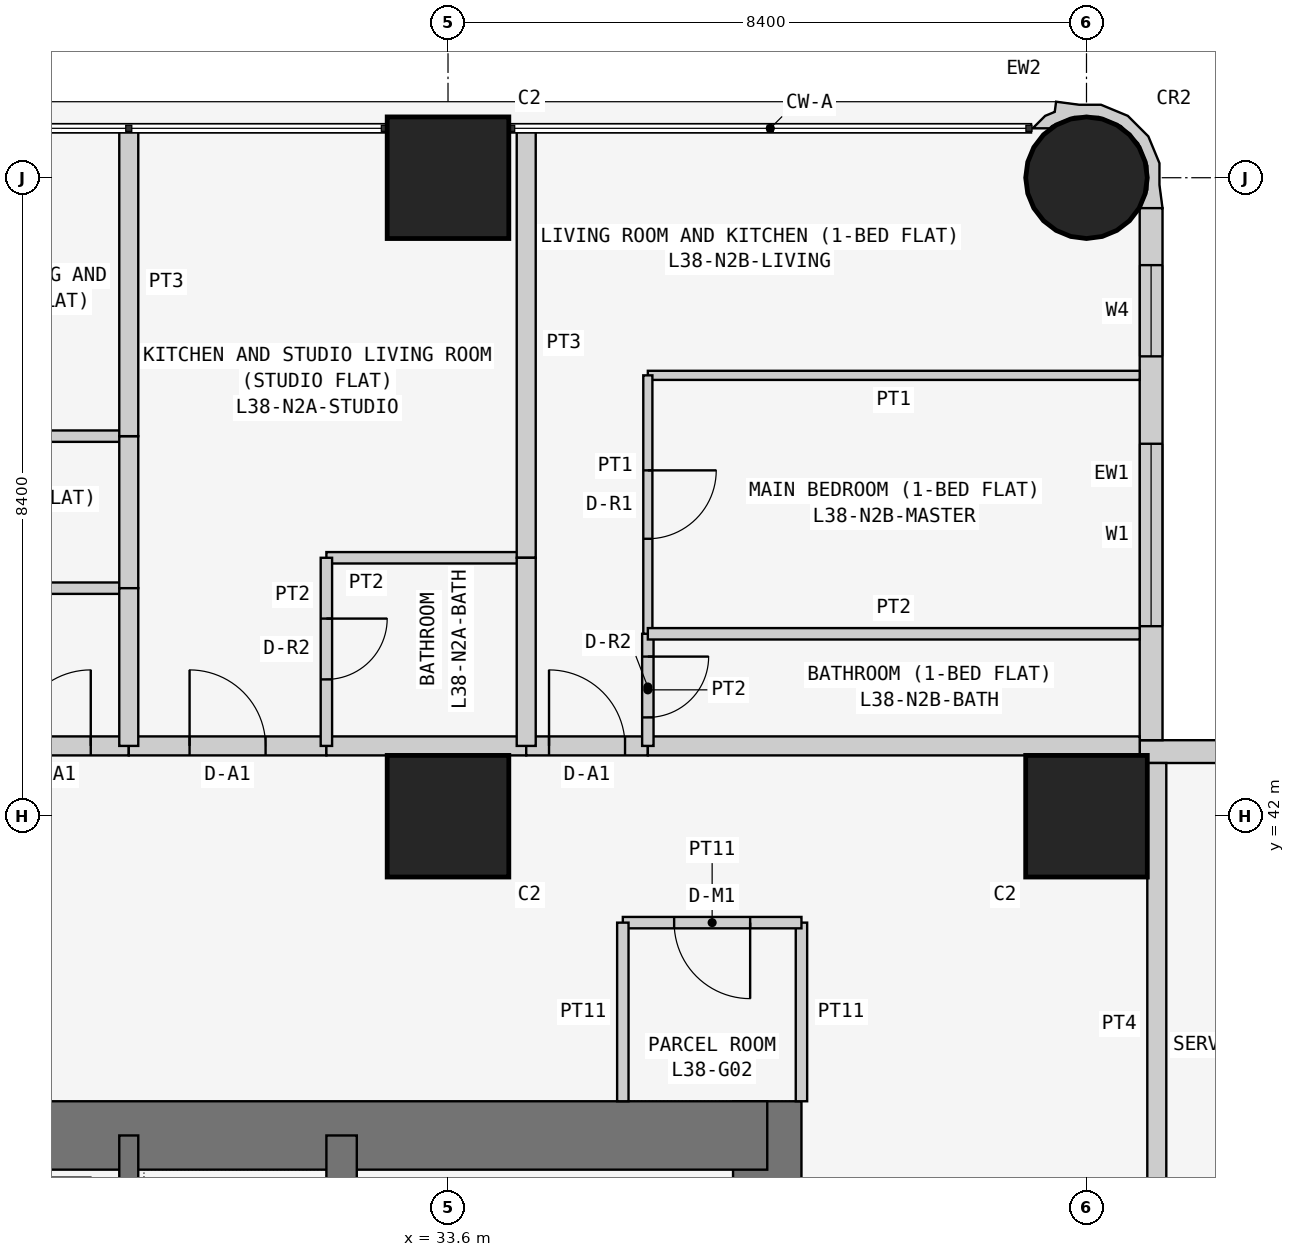
"""IFC4 building model, lengths in metres.
Left out: names, types, materials, properties, quantities, classifications, styles, units other than length and angle.
Written with IfcOpenShell. Run it as: python <this file> out.ifc"""

import sys

from ifc_helpers import new_model, si_unit, direction, frame, frame_2d, origin, origin_2d, place, context, subcontext, project, spatial, polyline, rectangle, circle, outline, extrude, element, fill, save


model = new_model("IFC4")
c1 = context("Model", 3, precision=1e-05, world=origin(), true_north=direction((0.0, 1.0)))
c2 = subcontext(c1, "Body", "Model", "MODEL_VIEW")
j1 = project(units=[si_unit("LENGTHUNIT", "METRE"), si_unit("PLANEANGLEUNIT", "RADIAN")], contexts=[c1])
p1 = place(None, origin())
s1 = spatial("IfcSite", under=j1, at=p1, CompositionType="ELEMENT")
p2 = place(p1, origin())
s2 = spatial("IfcBuilding", under=s1, at=p2, CompositionType="ELEMENT")
p3 = place(p2, frame((0.0, 0.0, 148.5)))
s3 = spatial("IfcBuildingStorey", under=s2, at=p3, CompositionType="ELEMENT", Elevation=148.5)
for number, where, z_axis, x_axis in (
    (1, (33.6, 42.0, 0.0), (0.0, 0.0, 1.0), (1.0, 0.0, 0.0)),
    (2, (33.6, 50.4, 0.0), (0.0, 0.0, 1.0), (1.0, 0.0, 0.0)),
    (3, (42.0, 42.0, 0.0), (0.0, 0.0, 1.0), (1.0, 0.0, 0.0)),
):
    element("IfcColumn", number, at=place(p3, frame(where, z_axis=z_axis, x_axis=x_axis)), inside=s3, PredefinedType="COLUMN", context=c2, shape_type="SweptSolid", body=[
        extrude(rectangle(XDim=1.6, YDim=1.6, at=origin_2d()), origin(), (0.0, 0.0, 1.0), 3.6),
    ])
p4 = place(p3, frame((42.0, 50.4, 0.0), z_axis=(0.0, 0.0, 1.0), x_axis=(1.0, 0.0, 0.0)))
e4 = element("IfcColumn", 4, at=p4, inside=s3, PredefinedType="COLUMN", context=c2, shape_type="SweptSolid", body=[
    extrude(circle(Radius=0.8, at=origin_2d()), origin(), (0.0, 0.0, 1.0), 3.6),
])
p5 = place(p3, frame((37.8, 21.0, 0.0), z_axis=(0.0, 0.0, 1.0), x_axis=(0.0, 1.0, 0.0)))
e5 = element("IfcWall", 5, at=p5, inside=s3, PredefinedType="SHEAR", context=c2, shape_type="SweptSolid", body=[
    extrude(rectangle(XDim=17.25, YDim=0.9, at=frame_2d((8.625, 0.0))), origin(), (0.0, 0.0, 1.0), 3.6),
])
p6 = place(p5, frame((5.2, 0.0, 0.0)))
e6 = element("IfcOpeningElement", 6, at=p6, cuts=e5, PredefinedType="OPENING", context=c2, shape_type="SweptSolid", body=[
    extrude(rectangle(XDim=1.2, YDim=2.1, at=frame_2d((0.6, 1.05))), frame((0.0, 0.46, 0.0), z_axis=(0.0, -1.0, 0.0), x_axis=(1.0, 0.0, 0.0)), (0.0, 0.0, 1.0), 0.92),
])
p7 = place(p3, frame((37.8, 37.8, 0.0), z_axis=(0.0, 0.0, 1.0), x_axis=(-1.0, 0.0, 0.0)))
e7 = element("IfcWall", 7, at=p7, inside=s3, PredefinedType="SHEAR", context=c2, shape_type="SweptSolid", body=[
    extrude(rectangle(XDim=17.25, YDim=0.9, at=frame_2d((8.625, 0.0))), origin(), (0.0, 0.0, 1.0), 3.6),
])
p8 = place(p3, frame((32.2, 29.2, 0.0), z_axis=(0.0, 0.0, 1.0), x_axis=(0.0, 1.0, 0.0)))
e8 = element("IfcWall", 8, at=p8, inside=s3, PredefinedType="SHEAR", context=c2, shape_type="SweptSolid", body=[
    extrude(rectangle(XDim=8.6, YDim=0.4, at=frame_2d((4.3, 0.0))), origin(), (0.0, 0.0, 1.0), 3.6),
])
p9 = place(p3, frame((29.4, 34.6, 0.0), z_axis=(0.0, 0.0, 1.0), x_axis=(0.0, 1.0, 0.0)))
e9 = element("IfcWall", 9, at=p9, inside=s3, PredefinedType="SHEAR", context=c2, shape_type="SweptSolid", body=[
    extrude(rectangle(XDim=3.2, YDim=0.25, at=frame_2d((1.6, 0.0))), origin(), (0.0, 0.0, 1.0), 3.6),
])
p10 = place(p3, frame((58.4, 42.85, 0.0), z_axis=(0.0, 0.0, 1.0), x_axis=(-1.0, 0.0, 0.0)))
e10 = element("IfcWall", 10, at=p10, inside=s3, PredefinedType="SOLIDWALL", context=c2, shape_type="SweptSolid", body=[
    extrude(rectangle(XDim=15.7, YDim=0.3, at=frame_2d((7.85, 0.0))), origin(), (0.0, 0.0, 1.0), 3.45),
])
p11 = place(p10, frame((12.4, 0.0, 0.9)))
e11 = element("IfcOpeningElement", 11, at=p11, cuts=e10, PredefinedType="OPENING", context=c2, shape_type="SweptSolid", body=[
    extrude(rectangle(XDim=1.8, YDim=1.5, at=frame_2d((0.9, 0.75))), frame((0.0, 0.16, 0.0), z_axis=(0.0, -1.0, 0.0), x_axis=(1.0, 0.0, 0.0)), (0.0, 0.0, 1.0), 0.32),
])
p12 = place(p10, frame((9.55, 0.0, 1.5)))
e12 = element("IfcOpeningElement", 12, at=p12, cuts=e10, PredefinedType="OPENING", context=c2, shape_type="SweptSolid", body=[
    extrude(rectangle(XDim=0.9, YDim=0.7, at=frame_2d((0.45, 0.35))), frame((0.0, 0.16, 0.0), z_axis=(0.0, -1.0, 0.0), x_axis=(1.0, 0.0, 0.0)), (0.0, 0.0, 1.0), 0.32),
])
p13 = place(p10, frame((5.1, 0.0, 0.9)))
e13 = element("IfcOpeningElement", 13, at=p13, cuts=e10, PredefinedType="OPENING", context=c2, shape_type="SweptSolid", body=[
    extrude(rectangle(XDim=1.8, YDim=1.5, at=frame_2d((0.9, 0.75))), frame((0.0, 0.16, 0.0), z_axis=(0.0, -1.0, 0.0), x_axis=(1.0, 0.0, 0.0)), (0.0, 0.0, 1.0), 0.32),
])
p14 = place(p10, frame((2.0, 0.0, 0.0)))
e14 = element("IfcOpeningElement", 14, at=p14, cuts=e10, PredefinedType="OPENING", context=c2, shape_type="SweptSolid", body=[
    extrude(rectangle(XDim=0.9, YDim=2.4, at=frame_2d((0.45, 1.2))), frame((0.0, 0.16, 0.0), z_axis=(0.0, -1.0, 0.0), x_axis=(1.0, 0.0, 0.0)), (0.0, 0.0, 1.0), 0.32),
])
p15 = place(p10, frame((0.7, 0.0, 0.9)))
e15 = element("IfcOpeningElement", 15, at=p15, cuts=e10, PredefinedType="OPENING", context=c2, shape_type="SweptSolid", body=[
    extrude(rectangle(XDim=1.2, YDim=1.5, at=frame_2d((0.6, 0.75))), frame((0.0, 0.16, 0.0), z_axis=(0.0, -1.0, 0.0), x_axis=(1.0, 0.0, 0.0)), (0.0, 0.0, 1.0), 0.32),
])
p16 = place(p3, frame((42.85, 43.0, 0.0), z_axis=(0.0, 0.0, 1.0), x_axis=(0.0, 1.0, 0.0)))
e16 = element("IfcWall", 16, at=p16, inside=s3, PredefinedType="SOLIDWALL", context=c2, shape_type="SweptSolid", body=[
    extrude(rectangle(XDim=7.0, YDim=0.3, at=frame_2d((3.5, 0.0))), origin(), (0.0, 0.0, 1.0), 3.45),
])
p17 = place(p16, frame((1.5, 0.0, 0.9)))
e17 = element("IfcOpeningElement", 17, at=p17, cuts=e16, PredefinedType="OPENING", context=c2, shape_type="SweptSolid", body=[
    extrude(rectangle(XDim=2.4, YDim=1.5, at=frame_2d((1.2, 0.75))), frame((0.0, 0.16, 0.0), z_axis=(0.0, -1.0, 0.0), x_axis=(1.0, 0.0, 0.0)), (0.0, 0.0, 1.0), 0.32),
])
p18 = place(p16, frame((5.05, 0.0, 0.9)))
e18 = element("IfcOpeningElement", 18, at=p18, cuts=e16, PredefinedType="OPENING", context=c2, shape_type="SweptSolid", body=[
    extrude(rectangle(XDim=1.2, YDim=1.5, at=frame_2d((0.6, 0.75))), frame((0.0, 0.16, 0.0), z_axis=(0.0, -1.0, 0.0), x_axis=(1.0, 0.0, 0.0)), (0.0, 0.0, 1.0), 0.32),
])
p19 = place(p3, frame((42.817, 50.073, 0.0), z_axis=(0.0, 0.0, 1.0), x_axis=(0.343276641956, 0.93923434088, 0.0)))
e19 = element("IfcWall", 19, at=p19, inside=s3, PredefinedType="SOLIDWALL", context=c2, shape_type="SweptSolid", body=[
    extrude(outline(polyline([(0.266, -0.055), (0.535, 0.044), (0.817, 0.302), (0.978, 0.648), (0.994, 1.03), (0.895, 1.3), (0.828, 1.598), (0.697, 1.569), (0.604, 1.67), (0.394, 1.767), (0.471, 1.556), (0.509, 1.539), (0.724, 1.304), (0.833, 1.005), (0.82, 0.687), (0.686, 0.397), (0.451, 0.182), (0.152, 0.073), (-0.116, 0.084), (-0.128, 0.078), (-0.146, 0.071), (-0.006, -0.197), (0.266, -0.055)])), origin(), (0.0, 0.0, 1.0), 3.45),
])
p20 = place(p3, frame((38.25, 38.25, 0.0), z_axis=(0.0, 0.0, 1.0), x_axis=(0.0, 1.0, 0.0)))
e20 = element("IfcWall", 20, at=p20, inside=s3, PredefinedType="PARTITIONING", context=c2, shape_type="SweptSolid", body=[
    extrude(rectangle(XDim=2.35, YDim=0.15, at=frame_2d((1.175, 0.0))), origin(), (0.0, 0.0, 1.0), 3.45),
])
p21 = place(p3, frame((38.25, 40.6, 0.0), z_axis=(0.0, 0.0, 1.0), x_axis=(-1.0, 0.0, 0.0)))
e21 = element("IfcWall", 21, at=p21, inside=s3, PredefinedType="PARTITIONING", context=c2, shape_type="SweptSolid", body=[
    extrude(rectangle(XDim=2.35, YDim=0.15, at=frame_2d((1.175, 0.0))), origin(), (0.0, 0.0, 1.0), 3.45),
])
p22 = place(p21, frame((0.675, 0.0, 0.0)))
e22 = element("IfcOpeningElement", 22, at=p22, cuts=e21, PredefinedType="OPENING", context=c2, shape_type="SweptSolid", body=[
    extrude(rectangle(XDim=1.0, YDim=2.1, at=frame_2d((0.5, 1.05))), frame((0.0, 0.085, 0.0), z_axis=(0.0, -1.0, 0.0), x_axis=(1.0, 0.0, 0.0)), (0.0, 0.0, 1.0), 0.17),
])
p23 = place(p3, frame((35.9, 40.6, 0.0), z_axis=(0.0, 0.0, 1.0), x_axis=(0.0, -1.0, 0.0)))
e23 = element("IfcWall", 23, at=p23, inside=s3, PredefinedType="PARTITIONING", context=c2, shape_type="SweptSolid", body=[
    extrude(rectangle(XDim=2.35, YDim=0.15, at=frame_2d((1.175, 0.0))), origin(), (0.0, 0.0, 1.0), 3.45),
])
p24 = place(p3, frame((22.971, 42.925, 0.0), z_axis=(0.0, 0.0, 1.0), x_axis=(1.0, 0.0, 0.0)))
e24 = element("IfcWall", 24, at=p24, inside=s3, PredefinedType="PARTITIONING", context=c2, shape_type="SweptSolid", body=[
    extrude(rectangle(XDim=6.429, YDim=0.25, at=frame_2d((3.214, 0.0))), origin(), (0.0, 0.0, 1.0), 3.45),
])
p25 = place(p24, frame((4.929, 0.0, 0.0)))
e25 = element("IfcOpeningElement", 25, at=p25, cuts=e24, PredefinedType="OPENING", context=c2, shape_type="SweptSolid", body=[
    extrude(rectangle(XDim=1.0, YDim=2.1, at=frame_2d((0.5, 1.05))), frame((0.0, 0.135, 0.0), z_axis=(0.0, -1.0, 0.0), x_axis=(1.0, 0.0, 0.0)), (0.0, 0.0, 1.0), 0.27),
])
p26 = place(p3, frame((29.4, 42.925, 0.0), z_axis=(0.0, 0.0, 1.0), x_axis=(1.0, 0.0, 0.0)))
e26 = element("IfcWall", 26, at=p26, inside=s3, PredefinedType="PARTITIONING", context=c2, shape_type="SweptSolid", body=[
    extrude(rectangle(XDim=2.6, YDim=0.25, at=frame_2d((1.3, 0.0))), origin(), (0.0, 0.0, 1.0), 3.45),
])
p27 = place(p26, frame((0.8, 0.0, 0.0)))
e27 = element("IfcOpeningElement", 27, at=p27, cuts=e26, PredefinedType="OPENING", context=c2, shape_type="SweptSolid", body=[
    extrude(rectangle(XDim=1.0, YDim=2.1, at=frame_2d((0.5, 1.05))), frame((0.0, 0.135, 0.0), z_axis=(0.0, -1.0, 0.0), x_axis=(1.0, 0.0, 0.0)), (0.0, 0.0, 1.0), 0.27),
])
p28 = place(p3, frame((32.0, 42.925, 0.0), z_axis=(0.0, 0.0, 1.0), x_axis=(1.0, 0.0, 0.0)))
e28 = element("IfcWall", 28, at=p28, inside=s3, PredefinedType="PARTITIONING", context=c2, shape_type="SweptSolid", body=[
    extrude(rectangle(XDim=2.629, YDim=0.25, at=frame_2d((1.314, 0.0))), origin(), (0.0, 0.0, 1.0), 3.45),
])
p29 = place(p3, frame((34.629, 42.925, 0.0), z_axis=(0.0, 0.0, 1.0), x_axis=(1.0, 0.0, 0.0)))
e29 = element("IfcWall", 29, at=p29, inside=s3, PredefinedType="PARTITIONING", context=c2, shape_type="SweptSolid", body=[
    extrude(rectangle(XDim=1.6, YDim=0.25, at=frame_2d((0.8, 0.0))), origin(), (0.0, 0.0, 1.0), 3.45),
])
p30 = place(p29, frame((0.3, 0.0, 0.0)))
e30 = element("IfcOpeningElement", 30, at=p30, cuts=e29, PredefinedType="OPENING", context=c2, shape_type="SweptSolid", body=[
    extrude(rectangle(XDim=1.0, YDim=2.1, at=frame_2d((0.5, 1.05))), frame((0.0, 0.135, 0.0), z_axis=(0.0, -1.0, 0.0), x_axis=(1.0, 0.0, 0.0)), (0.0, 0.0, 1.0), 0.27),
])
p31 = place(p3, frame((36.229, 42.925, 0.0), z_axis=(0.0, 0.0, 1.0), x_axis=(1.0, 0.0, 0.0)))
e31 = element("IfcWall", 31, at=p31, inside=s3, PredefinedType="PARTITIONING", context=c2, shape_type="SweptSolid", body=[
    extrude(rectangle(XDim=6.471, YDim=0.25, at=frame_2d((3.235, 0.0))), origin(), (0.0, 0.0, 1.0), 3.45),
])
p32 = place(p3, frame((42.925, 42.7, 0.0), z_axis=(0.0, 0.0, 1.0), x_axis=(0.0, -1.0, 0.0)))
e32 = element("IfcWall", 32, at=p32, inside=s3, PredefinedType="PARTITIONING", context=c2, shape_type="SweptSolid", body=[
    extrude(rectangle(XDim=6.871, YDim=0.25, at=frame_2d((3.436, 0.0))), origin(), (0.0, 0.0, 1.0), 3.45),
])
for number, where, z_axis, x_axis in (
    (33, (29.4, 47.0, 0.0), (0.0, 0.0, 1.0), (-1.0, 0.0, 0.0)),
    (34, (24.171, 45.0, 0.0), (0.0, 0.0, 1.0), (1.0, 0.0, 0.0)),
):
    element("IfcWall", number, at=place(p3, frame(where, z_axis=z_axis, x_axis=x_axis)), inside=s3, PredefinedType="PARTITIONING", context=c2, shape_type="SweptSolid", body=[
        extrude(rectangle(XDim=5.229, YDim=0.15, at=frame_2d((2.615, 0.0))), origin(), (0.0, 0.0, 1.0), 3.45),
    ])
p33 = place(p3, frame((29.4, 45.0, 0.0), z_axis=(0.0, 0.0, 1.0), x_axis=(0.0, 1.0, 0.0)))
e35 = element("IfcWall", 35, at=p33, inside=s3, PredefinedType="PARTITIONING", context=c2, shape_type="SweptSolid", body=[
    extrude(rectangle(XDim=2.0, YDim=0.25, at=frame_2d((1.0, 0.0))), origin(), (0.0, 0.0, 1.0), 2.848),
])
p34 = place(p3, frame((29.4, 45.0, 0.0), z_axis=(0.0, 0.0, 1.0), x_axis=(0.0, -1.0, 0.0)))
e36 = element("IfcWall", 36, at=p34, inside=s3, PredefinedType="PARTITIONING", context=c2, shape_type="SweptSolid", body=[
    extrude(rectangle(XDim=2.075, YDim=0.25, at=frame_2d((1.038, 0.0))), origin(), (0.0, 0.0, 1.0), 2.848),
])
p35 = place(p3, frame((29.4, 51.05, 0.0), z_axis=(0.0, 0.0, 1.0), x_axis=(0.0, -1.0, 0.0)))
e37 = element("IfcWall", 37, at=p35, inside=s3, PredefinedType="PARTITIONING", context=c2, shape_type="SweptSolid", body=[
    extrude(rectangle(XDim=4.05, YDim=0.25, at=frame_2d((2.025, 0.0))), origin(), (0.0, 0.0, 1.0), 2.848),
])
p36 = place(p3, frame((34.629, 45.4, 0.0), z_axis=(0.0, 0.0, 1.0), x_axis=(-1.0, 0.0, 0.0)))
e38 = element("IfcWall", 38, at=p36, inside=s3, PredefinedType="PARTITIONING", context=c2, shape_type="SweptSolid", body=[
    extrude(rectangle(XDim=2.629, YDim=0.15, at=frame_2d((1.314, 0.0))), origin(), (0.0, 0.0, 1.0), 3.45),
])
p37 = place(p3, frame((32.0, 45.4, 0.0), z_axis=(0.0, 0.0, 1.0), x_axis=(0.0, -1.0, 0.0)))
e39 = element("IfcWall", 39, at=p37, inside=s3, PredefinedType="PARTITIONING", context=c2, shape_type="SweptSolid", body=[
    extrude(rectangle(XDim=2.475, YDim=0.15, at=frame_2d((1.237, 0.0))), origin(), (0.0, 0.0, 1.0), 3.45),
])
p38 = place(p37, frame((0.8, 0.0, 0.0)))
e40 = element("IfcOpeningElement", 40, at=p38, cuts=e39, PredefinedType="OPENING", context=c2, shape_type="SweptSolid", body=[
    extrude(rectangle(XDim=0.8, YDim=2.1, at=frame_2d((0.4, 1.05))), frame((0.0, 0.085, 0.0), z_axis=(0.0, -1.0, 0.0), x_axis=(1.0, 0.0, 0.0)), (0.0, 0.0, 1.0), 0.17),
])
p39 = place(p3, frame((34.629, 51.05, 0.0), z_axis=(0.0, 0.0, 1.0), x_axis=(0.0, -1.0, 0.0)))
e41 = element("IfcWall", 41, at=p39, inside=s3, PredefinedType="PARTITIONING", context=c2, shape_type="SweptSolid", body=[
    extrude(rectangle(XDim=5.65, YDim=0.25, at=frame_2d((2.825, 0.0))), origin(), (0.0, 0.0, 1.0), 3.45),
])
p40 = place(p3, frame((34.629, 45.4, 0.0), z_axis=(0.0, 0.0, 1.0), x_axis=(0.0, -1.0, 0.0)))
e42 = element("IfcWall", 42, at=p40, inside=s3, PredefinedType="PARTITIONING", context=c2, shape_type="SweptSolid", body=[
    extrude(rectangle(XDim=2.475, YDim=0.25, at=frame_2d((1.237, 0.0))), origin(), (0.0, 0.0, 1.0), 3.45),
])
p41 = place(p3, frame((36.229, 44.4, 0.0), z_axis=(0.0, 0.0, 1.0), x_axis=(0.0, -1.0, 0.0)))
e43 = element("IfcWall", 43, at=p41, inside=s3, PredefinedType="PARTITIONING", context=c2, shape_type="SweptSolid", body=[
    extrude(rectangle(XDim=1.475, YDim=0.15, at=frame_2d((0.737, 0.0))), origin(), (0.0, 0.0, 1.0), 3.45),
])
p42 = place(p41, frame((0.3, 0.0, 0.0)))
e44 = element("IfcOpeningElement", 44, at=p42, cuts=e43, PredefinedType="OPENING", context=c2, shape_type="SweptSolid", body=[
    extrude(rectangle(XDim=0.8, YDim=2.1, at=frame_2d((0.4, 1.05))), frame((0.0, 0.085, 0.0), z_axis=(0.0, -1.0, 0.0), x_axis=(1.0, 0.0, 0.0)), (0.0, 0.0, 1.0), 0.17),
])
p43 = place(p3, frame((42.7, 47.8, 0.0), z_axis=(0.0, 0.0, 1.0), x_axis=(-1.0, 0.0, 0.0)))
e45 = element("IfcWall", 45, at=p43, inside=s3, PredefinedType="PARTITIONING", context=c2, shape_type="SweptSolid", body=[
    extrude(rectangle(XDim=6.471, YDim=0.12, at=frame_2d((3.235, 0.0))), origin(), (0.0, 0.0, 1.0), 3.45),
])
p44 = place(p3, frame((36.229, 47.8, 0.0), z_axis=(0.0, 0.0, 1.0), x_axis=(0.0, -1.0, 0.0)))
e46 = element("IfcWall", 46, at=p44, inside=s3, PredefinedType="PARTITIONING", context=c2, shape_type="SweptSolid", body=[
    extrude(rectangle(XDim=3.4, YDim=0.12, at=frame_2d((1.7, 0.0))), origin(), (0.0, 0.0, 1.0), 3.45),
])
p45 = place(p44, frame((1.25, 0.0, 0.0)))
e47 = element("IfcOpeningElement", 47, at=p45, cuts=e46, PredefinedType="OPENING", context=c2, shape_type="SweptSolid", body=[
    extrude(rectangle(XDim=0.9, YDim=2.1, at=frame_2d((0.45, 1.05))), frame((0.0, 0.07, 0.0), z_axis=(0.0, -1.0, 0.0), x_axis=(1.0, 0.0, 0.0)), (0.0, 0.0, 1.0), 0.14),
])
p46 = place(p3, frame((36.229, 44.4, 0.0), z_axis=(0.0, 0.0, 1.0), x_axis=(1.0, 0.0, 0.0)))
e48 = element("IfcWall", 48, at=p46, inside=s3, PredefinedType="PARTITIONING", context=c2, shape_type="SweptSolid", body=[
    extrude(rectangle(XDim=6.471, YDim=0.15, at=frame_2d((3.235, 0.0))), origin(), (0.0, 0.0, 1.0), 3.45),
])
p47 = place(p17, origin())
e49 = element("IfcWindow", 49, at=p47, inside=s3, PartitioningType="SINGLE_PANEL", PredefinedType="WINDOW", context=c2, shape_type="SweptSolid", body=[
    extrude(rectangle(XDim=2.4, YDim=1.5, at=frame_2d((1.2, 0.75))), frame((0.0, 0.03, 0.0), z_axis=(0.0, -1.0, 0.0), x_axis=(1.0, 0.0, 0.0)), (0.0, 0.0, 1.0), 0.06),
])
fill(e17, e49)
p48 = place(p18, origin())
e50 = element("IfcWindow", 50, at=p48, inside=s3, PartitioningType="SINGLE_PANEL", PredefinedType="WINDOW", context=c2, shape_type="SweptSolid", body=[
    extrude(rectangle(XDim=1.2, YDim=1.5, at=frame_2d((0.6, 0.75))), frame((0.0, 0.03, 0.0), z_axis=(0.0, -1.0, 0.0), x_axis=(1.0, 0.0, 0.0)), (0.0, 0.0, 1.0), 0.06),
])
fill(e18, e50)
p49 = place(p22, origin())
e51 = element("IfcDoor", 51, at=p49, inside=s3, OperationType="SINGLE_SWING_LEFT", PredefinedType="DOOR", context=c2, shape_type="SweptSolid", body=[
    extrude(rectangle(XDim=1.0, YDim=2.1, at=frame_2d((0.5, 1.05))), frame((0.0, 0.025, 0.0), z_axis=(0.0, -1.0, 0.0), x_axis=(1.0, 0.0, 0.0)), (0.0, 0.0, 1.0), 0.05),
])
fill(e22, e51)
p50 = place(p25, origin())
e52 = element("IfcDoor", 52, at=p50, inside=s3, OperationType="SINGLE_SWING_RIGHT", PredefinedType="DOOR", context=c2, shape_type="SweptSolid", body=[
    extrude(rectangle(XDim=1.0, YDim=2.1, at=frame_2d((0.5, 1.05))), frame((0.0, 0.025, 0.0), z_axis=(0.0, -1.0, 0.0), x_axis=(1.0, 0.0, 0.0)), (0.0, 0.0, 1.0), 0.05),
])
fill(e25, e52)
p51 = place(p27, origin())
e53 = element("IfcDoor", 53, at=p51, inside=s3, OperationType="SINGLE_SWING_LEFT", PredefinedType="DOOR", context=c2, shape_type="SweptSolid", body=[
    extrude(rectangle(XDim=1.0, YDim=2.1, at=frame_2d((0.5, 1.05))), frame((0.0, 0.025, 0.0), z_axis=(0.0, -1.0, 0.0), x_axis=(1.0, 0.0, 0.0)), (0.0, 0.0, 1.0), 0.05),
])
fill(e27, e53)
p52 = place(p38, origin())
e54 = element("IfcDoor", 54, at=p52, inside=s3, OperationType="SINGLE_SWING_LEFT", PredefinedType="DOOR", context=c2, shape_type="SweptSolid", body=[
    extrude(rectangle(XDim=0.8, YDim=2.1, at=frame_2d((0.4, 1.05))), frame((0.0, 0.025, 0.0), z_axis=(0.0, -1.0, 0.0), x_axis=(1.0, 0.0, 0.0)), (0.0, 0.0, 1.0), 0.05),
])
fill(e40, e54)
p53 = place(p30, origin())
e55 = element("IfcDoor", 55, at=p53, inside=s3, OperationType="SINGLE_SWING_LEFT", PredefinedType="DOOR", context=c2, shape_type="SweptSolid", body=[
    extrude(rectangle(XDim=1.0, YDim=2.1, at=frame_2d((0.5, 1.05))), frame((0.0, 0.025, 0.0), z_axis=(0.0, -1.0, 0.0), x_axis=(1.0, 0.0, 0.0)), (0.0, 0.0, 1.0), 0.05),
])
fill(e30, e55)
p54 = place(p42, origin())
e56 = element("IfcDoor", 56, at=p54, inside=s3, OperationType="SINGLE_SWING_LEFT", PredefinedType="DOOR", context=c2, shape_type="SweptSolid", body=[
    extrude(rectangle(XDim=0.8, YDim=2.1, at=frame_2d((0.4, 1.05))), frame((0.0, 0.025, 0.0), z_axis=(0.0, -1.0, 0.0), x_axis=(1.0, 0.0, 0.0)), (0.0, 0.0, 1.0), 0.05),
])
fill(e44, e56)
p55 = place(p45, origin())
e57 = element("IfcDoor", 57, at=p55, inside=s3, OperationType="SINGLE_SWING_LEFT", PredefinedType="DOOR", context=c2, shape_type="SweptSolid", body=[
    extrude(rectangle(XDim=0.9, YDim=2.1, at=frame_2d((0.45, 1.05))), frame((0.0, 0.025, 0.0), z_axis=(0.0, -1.0, 0.0), x_axis=(1.0, 0.0, 0.0)), (0.0, 0.0, 1.0), 0.05),
])
fill(e47, e57)
save(model, sys.argv[1])
